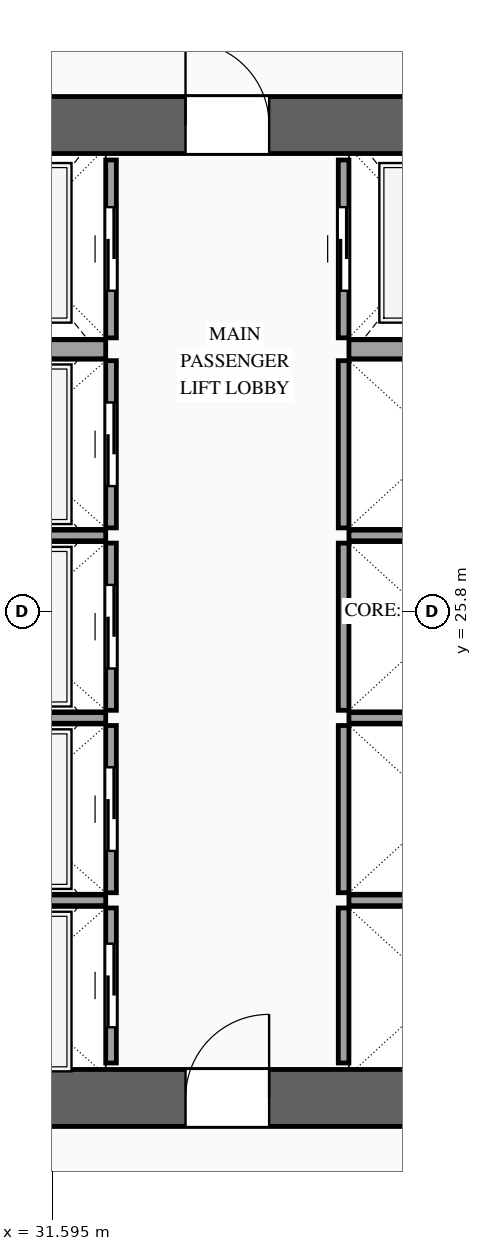
"""IFC4 building model, lengths in metres.
Left out: names, types, materials, properties, quantities, classifications, styles, units other than length and angle.
Written with IfcOpenShell. Run it as: python <this file> out.ifc"""

import sys

from ifc_helpers import new_model, si_unit, direction, frame, frame_2d, origin, place, context, subcontext, project, spatial, rectangle, extrude, source, transform, mapped, element, fill, save


model = new_model("IFC4")
c1 = context("Model", 3, precision=1e-05, world=origin(), true_north=direction((0.0, 1.0)))
c2 = subcontext(c1, "Body", "Model", "MODEL_VIEW")
j1 = project(units=[si_unit("LENGTHUNIT", "METRE"), si_unit("PLANEANGLEUNIT", "RADIAN")], contexts=[c1])
p1 = place(None, origin())
s1 = spatial("IfcSite", under=j1, at=p1, CompositionType="ELEMENT")
p2 = place(p1, origin())
s2 = spatial("IfcBuilding", under=s1, at=p2, CompositionType="ELEMENT")
p3 = place(p2, frame((0.0, 0.0, 134.4)))
s3 = spatial("IfcBuildingStorey", under=s2, at=p3, CompositionType="ELEMENT", Elevation=134.4)
p4 = place(p3, frame((23.425, 19.4, 0.0), z_axis=(0.0, 0.0, 1.0), x_axis=(1.0, 0.0, 0.0)))
e1 = element("IfcWall", 1, at=p4, inside=s3, PredefinedType="SHEAR", context=c2, shape_type="SweptSolid", body=[
    extrude(rectangle(XDim=27.15, YDim=0.75, at=frame_2d((13.575, 0.0))), origin(), (0.0, 0.0, 1.0), 3.6),
])
p5 = place(p4, frame((2.025, 0.0, 0.0)))
e2 = element("IfcOpeningElement", 2, at=p5, cuts=e1, PredefinedType="OPENING", context=c2, shape_type="SweptSolid", body=[
    extrude(rectangle(XDim=1.1, YDim=2.2, at=frame_2d((0.55, 1.1))), frame((0.0, 0.39, 0.0), z_axis=(0.0, -1.0, 0.0), x_axis=(1.0, 0.0, 0.0)), (0.0, 0.0, 1.0), 0.78),
])
p6 = place(p4, frame((9.925, 0.0, 0.0)))
e3 = element("IfcOpeningElement", 3, at=p6, cuts=e1, PredefinedType="OPENING", context=c2, shape_type="SweptSolid", body=[
    extrude(rectangle(XDim=1.1, YDim=2.2, at=frame_2d((0.55, 1.1))), frame((0.0, 0.39, 0.0), z_axis=(0.0, -1.0, 0.0), x_axis=(1.0, 0.0, 0.0)), (0.0, 0.0, 1.0), 0.78),
])
p7 = place(p4, frame((23.125, 0.0, 0.0)))
e4 = element("IfcOpeningElement", 4, at=p7, cuts=e1, PredefinedType="OPENING", context=c2, shape_type="SweptSolid", body=[
    extrude(rectangle(XDim=1.1, YDim=2.2, at=frame_2d((0.55, 1.1))), frame((0.0, 0.39, 0.0), z_axis=(0.0, -1.0, 0.0), x_axis=(1.0, 0.0, 0.0)), (0.0, 0.0, 1.0), 0.78),
])
p8 = place(p4, frame((19.745, 0.0, 0.0)))
e5 = element("IfcOpeningElement", 5, at=p8, cuts=e1, PredefinedType="OPENING", context=c2, shape_type="SweptSolid", body=[
    extrude(rectangle(XDim=0.9, YDim=2.15, at=frame_2d((0.45, 1.075))), frame((0.0, 0.39, 0.0), z_axis=(0.0, -1.0, 0.0), x_axis=(1.0, 0.0, 0.0)), (0.0, 0.0, 1.0), 0.78),
])
p9 = place(p4, frame((18.305, 0.0, 0.0)))
e6 = element("IfcOpeningElement", 6, at=p9, cuts=e1, PredefinedType="OPENING", context=c2, shape_type="SweptSolid", body=[
    extrude(rectangle(XDim=0.9, YDim=2.15, at=frame_2d((0.45, 1.075))), frame((0.0, 0.39, 0.0), z_axis=(0.0, -1.0, 0.0), x_axis=(1.0, 0.0, 0.0)), (0.0, 0.0, 1.0), 0.78),
])
p10 = place(p3, frame((23.425, 32.2, 0.0), z_axis=(0.0, 0.0, 1.0), x_axis=(1.0, 0.0, 0.0)))
e7 = element("IfcWall", 7, at=p10, inside=s3, PredefinedType="SHEAR", context=c2, shape_type="SweptSolid", body=[
    extrude(rectangle(XDim=27.15, YDim=0.75, at=frame_2d((13.575, 0.0))), origin(), (0.0, 0.0, 1.0), 3.6),
])
p11 = place(p10, frame((4.645, 0.0, 0.0)))
e8 = element("IfcOpeningElement", 8, at=p11, cuts=e7, PredefinedType="OPENING", context=c2, shape_type="SweptSolid", body=[
    extrude(rectangle(XDim=0.9, YDim=2.15, at=frame_2d((0.45, 1.075))), frame((0.0, 0.39, 0.0), z_axis=(0.0, -1.0, 0.0), x_axis=(1.0, 0.0, 0.0)), (0.0, 0.0, 1.0), 0.78),
])
p12 = place(p10, frame((9.925, 0.0, 0.0)))
e9 = element("IfcOpeningElement", 9, at=p12, cuts=e7, PredefinedType="OPENING", context=c2, shape_type="SweptSolid", body=[
    extrude(rectangle(XDim=1.1, YDim=2.2, at=frame_2d((0.55, 1.1))), frame((0.0, 0.39, 0.0), z_axis=(0.0, -1.0, 0.0), x_axis=(1.0, 0.0, 0.0)), (0.0, 0.0, 1.0), 0.78),
])
p13 = place(p10, frame((15.775, 0.0, 0.0)))
e10 = element("IfcOpeningElement", 10, at=p13, cuts=e7, PredefinedType="OPENING", context=c2, shape_type="SweptSolid", body=[
    extrude(rectangle(XDim=1.1, YDim=2.2, at=frame_2d((0.55, 1.1))), frame((0.0, 0.39, 0.0), z_axis=(0.0, -1.0, 0.0), x_axis=(1.0, 0.0, 0.0)), (0.0, 0.0, 1.0), 0.78),
])
p14 = place(p10, frame((18.975, 0.0, 0.0)))
e11 = element("IfcOpeningElement", 11, at=p14, cuts=e7, PredefinedType="OPENING", context=c2, shape_type="SweptSolid", body=[
    extrude(rectangle(XDim=0.9, YDim=2.15, at=frame_2d((0.45, 1.075))), frame((0.0, 0.39, 0.0), z_axis=(0.0, -1.0, 0.0), x_axis=(1.0, 0.0, 0.0)), (0.0, 0.0, 1.0), 0.78),
])
p15 = place(p3, frame((32.37, 19.86, 0.0), z_axis=(0.0, 0.0, 1.0), x_axis=(0.0, 1.0, 0.0)))
e12 = element("IfcWall", 12, at=p15, inside=s3, PredefinedType="SOLIDWALL", context=c2, shape_type="SweptSolid", body=[
    extrude(rectangle(XDim=2.04, YDim=0.14, at=frame_2d((1.02, 0.0))), origin(), (0.0, 0.0, 1.0), 3.38),
])
p16 = place(p15, frame((0.47, 0.0, 0.0)))
e13 = element("IfcOpeningElement", 13, at=p16, cuts=e12, PredefinedType="OPENING", context=c2, shape_type="SweptSolid", body=[
    extrude(rectangle(XDim=1.1, YDim=2.2, at=frame_2d((0.55, 1.1))), frame((0.0, 0.085, 0.0), z_axis=(0.0, -1.0, 0.0), x_axis=(1.0, 0.0, 0.0)), (0.0, 0.0, 1.0), 0.17),
])
m1 = source(origin(), c2, "Body", "SweptSolid", [
    extrude(rectangle(XDim=2.5, YDim=0.14, at=frame_2d((1.25, 0.0))), origin(), (0.0, 0.0, 1.0), 3.38),
])
p17 = place(p3, frame((29.8, 22.0, 0.0), z_axis=(0.0, 0.0, 1.0), x_axis=(1.0, 0.0, 0.0)))
e14 = element("IfcWall", 14, at=p17, inside=s3, PredefinedType="SOLIDWALL", context=c2, shape_type="MappedRepresentation", body=[
    mapped(m1, transform((0.0, 0.0, 0.0), scale=1.0)),
])
p18 = place(p3, frame((32.37, 22.1, 0.0), z_axis=(0.0, 0.0, 1.0), x_axis=(0.0, 1.0, 0.0)))
e15 = element("IfcWall", 15, at=p18, inside=s3, PredefinedType="SOLIDWALL", context=c2, shape_type="SweptSolid", body=[
    extrude(rectangle(XDim=2.2, YDim=0.14, at=frame_2d((1.1, 0.0))), origin(), (0.0, 0.0, 1.0), 3.38),
])
p19 = place(p18, frame((0.55, 0.0, 0.0)))
e16 = element("IfcOpeningElement", 16, at=p19, cuts=e15, PredefinedType="OPENING", context=c2, shape_type="SweptSolid", body=[
    extrude(rectangle(XDim=1.1, YDim=2.2, at=frame_2d((0.55, 1.1))), frame((0.0, 0.085, 0.0), z_axis=(0.0, -1.0, 0.0), x_axis=(1.0, 0.0, 0.0)), (0.0, 0.0, 1.0), 0.17),
])
p20 = place(p3, frame((29.8, 24.4, 0.0), z_axis=(0.0, 0.0, 1.0), x_axis=(1.0, 0.0, 0.0)))
e17 = element("IfcWall", 17, at=p20, inside=s3, PredefinedType="SOLIDWALL", context=c2, shape_type="MappedRepresentation", body=[
    mapped(m1, transform((0.0, 0.0, 0.0), scale=1.0)),
])
p21 = place(p3, frame((32.37, 24.5, 0.0), z_axis=(0.0, 0.0, 1.0), x_axis=(0.0, 1.0, 0.0)))
e18 = element("IfcWall", 18, at=p21, inside=s3, PredefinedType="SOLIDWALL", context=c2, shape_type="SweptSolid", body=[
    extrude(rectangle(XDim=2.2, YDim=0.14, at=frame_2d((1.1, 0.0))), origin(), (0.0, 0.0, 1.0), 3.38),
])
p22 = place(p21, frame((0.55, 0.0, 0.0)))
e19 = element("IfcOpeningElement", 19, at=p22, cuts=e18, PredefinedType="OPENING", context=c2, shape_type="SweptSolid", body=[
    extrude(rectangle(XDim=1.1, YDim=2.2, at=frame_2d((0.55, 1.1))), frame((0.0, 0.085, 0.0), z_axis=(0.0, -1.0, 0.0), x_axis=(1.0, 0.0, 0.0)), (0.0, 0.0, 1.0), 0.17),
])
p23 = place(p3, frame((29.8, 26.8, 0.0), z_axis=(0.0, 0.0, 1.0), x_axis=(1.0, 0.0, 0.0)))
e20 = element("IfcWall", 20, at=p23, inside=s3, PredefinedType="SOLIDWALL", context=c2, shape_type="MappedRepresentation", body=[
    mapped(m1, transform((0.0, 0.0, 0.0), scale=1.0)),
])
p24 = place(p3, frame((32.37, 26.9, 0.0), z_axis=(0.0, 0.0, 1.0), x_axis=(0.0, 1.0, 0.0)))
e21 = element("IfcWall", 21, at=p24, inside=s3, PredefinedType="SOLIDWALL", context=c2, shape_type="SweptSolid", body=[
    extrude(rectangle(XDim=2.2, YDim=0.14, at=frame_2d((1.1, 0.0))), origin(), (0.0, 0.0, 1.0), 3.38),
])
p25 = place(p24, frame((0.55, 0.0, 0.0)))
e22 = element("IfcOpeningElement", 22, at=p25, cuts=e21, PredefinedType="OPENING", context=c2, shape_type="SweptSolid", body=[
    extrude(rectangle(XDim=1.1, YDim=2.2, at=frame_2d((0.55, 1.1))), frame((0.0, 0.085, 0.0), z_axis=(0.0, -1.0, 0.0), x_axis=(1.0, 0.0, 0.0)), (0.0, 0.0, 1.0), 0.17),
])
p26 = place(p3, frame((32.37, 29.4, 0.0), z_axis=(0.0, 0.0, 1.0), x_axis=(0.0, 1.0, 0.0)))
e23 = element("IfcWall", 23, at=p26, inside=s3, PredefinedType="SOLIDWALL", context=c2, shape_type="SweptSolid", body=[
    extrude(rectangle(XDim=2.34, YDim=0.14, at=frame_2d((1.17, 0.0))), origin(), (0.0, 0.0, 1.0), 3.38),
])
p27 = place(p26, frame((0.62, 0.0, 0.0)))
e24 = element("IfcOpeningElement", 24, at=p27, cuts=e23, PredefinedType="OPENING", context=c2, shape_type="SweptSolid", body=[
    extrude(rectangle(XDim=1.1, YDim=2.2, at=frame_2d((0.55, 1.1))), frame((0.0, 0.085, 0.0), z_axis=(0.0, -1.0, 0.0), x_axis=(1.0, 0.0, 0.0)), (0.0, 0.0, 1.0), 0.17),
])
m2 = source(origin(), c2, "Body", "SweptSolid", [
    extrude(rectangle(XDim=2.5, YDim=0.25, at=frame_2d((1.25, 0.0))), origin(), (0.0, 0.0, 1.0), 3.38),
])
p28 = place(p3, frame((29.8, 29.25, 0.0), z_axis=(0.0, 0.0, 1.0), x_axis=(1.0, 0.0, 0.0)))
e25 = element("IfcWall", 25, at=p28, inside=s3, PredefinedType="SOLIDWALL", context=c2, shape_type="MappedRepresentation", body=[
    mapped(m2, transform((0.0, 0.0, 0.0), scale=1.0)),
])
m3 = source(origin(), c2, "Body", "SweptSolid", [
    extrude(rectangle(XDim=2.04, YDim=0.14, at=frame_2d((1.02, 0.0))), origin(), (0.0, 0.0, 1.0), 3.38),
])
p29 = place(p3, frame((35.43, 19.86, 0.0), z_axis=(0.0, 0.0, 1.0), x_axis=(0.0, 1.0, 0.0)))
e26 = element("IfcWall", 26, at=p29, inside=s3, PredefinedType="SOLIDWALL", context=c2, shape_type="MappedRepresentation", body=[
    mapped(m3, transform((0.0, 0.0, 0.0), scale=1.0)),
])
m4 = source(origin(), c2, "Body", "SweptSolid", [
    extrude(rectangle(XDim=2.4, YDim=0.14, at=frame_2d((1.2, 0.0))), origin(), (0.0, 0.0, 1.0), 3.38),
])
p30 = place(p3, frame((35.5, 22.0, 0.0), z_axis=(0.0, 0.0, 1.0), x_axis=(1.0, 0.0, 0.0)))
e27 = element("IfcWall", 27, at=p30, inside=s3, PredefinedType="SOLIDWALL", context=c2, shape_type="MappedRepresentation", body=[
    mapped(m4, transform((0.0, 0.0, 0.0), scale=1.0)),
])
m5 = source(origin(), c2, "Body", "SweptSolid", [
    extrude(rectangle(XDim=2.2, YDim=0.14, at=frame_2d((1.1, 0.0))), origin(), (0.0, 0.0, 1.0), 3.38),
])
p31 = place(p3, frame((35.43, 22.1, 0.0), z_axis=(0.0, 0.0, 1.0), x_axis=(0.0, 1.0, 0.0)))
e28 = element("IfcWall", 28, at=p31, inside=s3, PredefinedType="SOLIDWALL", context=c2, shape_type="MappedRepresentation", body=[
    mapped(m5, transform((0.0, 0.0, 0.0), scale=1.0)),
])
p32 = place(p3, frame((35.5, 24.4, 0.0), z_axis=(0.0, 0.0, 1.0), x_axis=(1.0, 0.0, 0.0)))
e29 = element("IfcWall", 29, at=p32, inside=s3, PredefinedType="SOLIDWALL", context=c2, shape_type="MappedRepresentation", body=[
    mapped(m4, transform((0.0, 0.0, 0.0), scale=1.0)),
])
p33 = place(p3, frame((35.43, 24.5, 0.0), z_axis=(0.0, 0.0, 1.0), x_axis=(0.0, 1.0, 0.0)))
e30 = element("IfcWall", 30, at=p33, inside=s3, PredefinedType="SOLIDWALL", context=c2, shape_type="MappedRepresentation", body=[
    mapped(m5, transform((0.0, 0.0, 0.0), scale=1.0)),
])
p34 = place(p3, frame((35.5, 26.8, 0.0), z_axis=(0.0, 0.0, 1.0), x_axis=(1.0, 0.0, 0.0)))
e31 = element("IfcWall", 31, at=p34, inside=s3, PredefinedType="SOLIDWALL", context=c2, shape_type="MappedRepresentation", body=[
    mapped(m4, transform((0.0, 0.0, 0.0), scale=1.0)),
])
m6 = source(origin(), c2, "Body", "SweptSolid", [
    extrude(rectangle(XDim=2.2, YDim=0.14, at=frame_2d((1.1, 0.0))), origin(), (0.0, 0.0, 1.0), 3.38),
])
p35 = place(p3, frame((35.43, 26.9, 0.0), z_axis=(0.0, 0.0, 1.0), x_axis=(0.0, 1.0, 0.0)))
e32 = element("IfcWall", 32, at=p35, inside=s3, PredefinedType="SOLIDWALL", context=c2, shape_type="MappedRepresentation", body=[
    mapped(m6, transform((0.0, 0.0, 0.0), scale=1.0)),
])
p36 = place(p3, frame((35.43, 29.4, 0.0), z_axis=(0.0, 0.0, 1.0), x_axis=(0.0, 1.0, 0.0)))
e33 = element("IfcWall", 33, at=p36, inside=s3, PredefinedType="SOLIDWALL", context=c2, shape_type="SweptSolid", body=[
    extrude(rectangle(XDim=2.34, YDim=0.14, at=frame_2d((1.17, 0.0))), origin(), (0.0, 0.0, 1.0), 3.38),
])
p37 = place(p36, frame((0.62, 0.0, 0.0)))
e34 = element("IfcOpeningElement", 34, at=p37, cuts=e33, PredefinedType="OPENING", context=c2, shape_type="SweptSolid", body=[
    extrude(rectangle(XDim=1.1, YDim=2.2, at=frame_2d((0.55, 1.1))), frame((0.0, 0.085, 0.0), z_axis=(0.0, -1.0, 0.0), x_axis=(1.0, 0.0, 0.0)), (0.0, 0.0, 1.0), 0.17),
])
m7 = source(origin(), c2, "Body", "SweptSolid", [
    extrude(rectangle(XDim=2.4, YDim=0.25, at=frame_2d((1.2, 0.0))), origin(), (0.0, 0.0, 1.0), 3.38),
])
p38 = place(p3, frame((35.5, 29.25, 0.0), z_axis=(0.0, 0.0, 1.0), x_axis=(1.0, 0.0, 0.0)))
e35 = element("IfcWall", 35, at=p38, inside=s3, PredefinedType="SOLIDWALL", context=c2, shape_type="MappedRepresentation", body=[
    mapped(m7, transform((0.0, 0.0, 0.0), scale=1.0)),
])
m8 = source(origin(), c2, "Body", "SweptSolid", [
    extrude(rectangle(XDim=1.1, YDim=2.2, at=frame_2d((0.55, 1.1))), frame((0.0, 0.025, 0.0), z_axis=(0.0, -1.0, 0.0), x_axis=(1.0, 0.0, 0.0)), (0.0, 0.0, 1.0), 0.05),
])
p39 = place(p16, origin())
e36 = element("IfcDoor", 36, at=p39, inside=s3, OperationType="SLIDING_TO_LEFT", PredefinedType="DOOR", context=c2, shape_type="MappedRepresentation", body=[
    mapped(m8, transform((0.0, 0.0, 0.0), scale=1.0)),
])
fill(e13, e36)
p40 = place(p19, origin())
e37 = element("IfcDoor", 37, at=p40, inside=s3, OperationType="SLIDING_TO_RIGHT", PredefinedType="DOOR", context=c2, shape_type="MappedRepresentation", body=[
    mapped(m8, transform((0.0, 0.0, 0.0), scale=1.0)),
])
fill(e16, e37)
p41 = place(p22, origin())
e38 = element("IfcDoor", 38, at=p41, inside=s3, OperationType="SLIDING_TO_LEFT", PredefinedType="DOOR", context=c2, shape_type="MappedRepresentation", body=[
    mapped(m8, transform((0.0, 0.0, 0.0), scale=1.0)),
])
fill(e19, e38)
p42 = place(p25, origin())
e39 = element("IfcDoor", 39, at=p42, inside=s3, OperationType="SLIDING_TO_RIGHT", PredefinedType="DOOR", context=c2, shape_type="MappedRepresentation", body=[
    mapped(m8, transform((0.0, 0.0, 0.0), scale=1.0)),
])
fill(e22, e39)
p43 = place(p27, origin())
e40 = element("IfcDoor", 40, at=p43, inside=s3, OperationType="SLIDING_TO_LEFT", PredefinedType="DOOR", context=c2, shape_type="MappedRepresentation", body=[
    mapped(m8, transform((0.0, 0.0, 0.0), scale=1.0)),
])
fill(e24, e40)
p44 = place(p37, origin())
e41 = element("IfcDoor", 41, at=p44, inside=s3, OperationType="SLIDING_TO_RIGHT", PredefinedType="DOOR", context=c2, shape_type="MappedRepresentation", body=[
    mapped(m8, transform((0.0, 0.0, 0.0), scale=1.0)),
])
fill(e34, e41)
m9 = source(origin(), c2, "Body", "SweptSolid", [
    extrude(rectangle(XDim=1.1, YDim=2.2, at=frame_2d((0.55, 1.1))), frame((0.0, 0.025, 0.0), z_axis=(0.0, -1.0, 0.0), x_axis=(1.0, 0.0, 0.0)), (0.0, 0.0, 1.0), 0.05),
])
p45 = place(p6, origin())
e42 = element("IfcDoor", 42, at=p45, inside=s3, OperationType="SINGLE_SWING_RIGHT", PredefinedType="DOOR", context=c2, shape_type="MappedRepresentation", body=[
    mapped(m9, transform((0.0, 0.0, 0.0), scale=1.0)),
])
fill(e3, e42)
p46 = place(p12, origin())
e43 = element("IfcDoor", 43, at=p46, inside=s3, OperationType="SINGLE_SWING_LEFT", PredefinedType="DOOR", context=c2, shape_type="MappedRepresentation", body=[
    mapped(m9, transform((0.0, 0.0, 0.0), scale=1.0)),
])
fill(e9, e43)
save(model, sys.argv[1])
